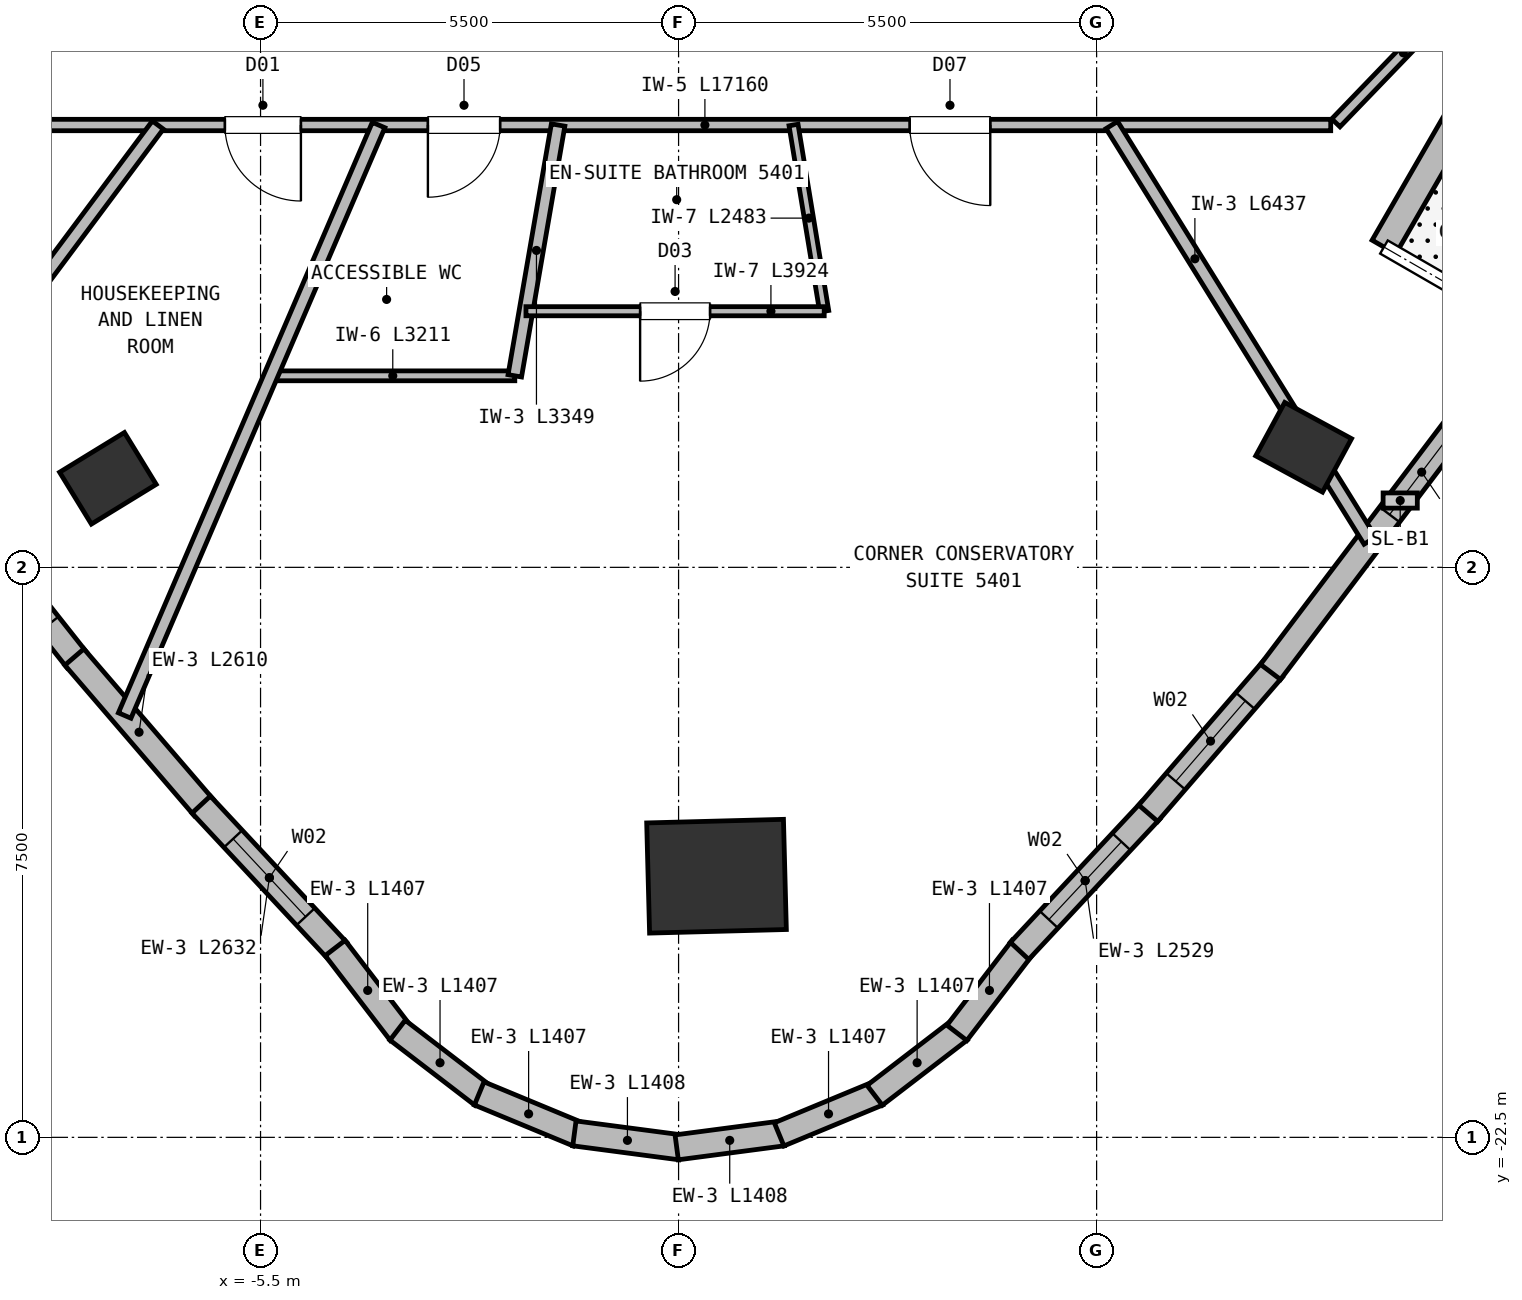
"""IFC4 building model, lengths in metres.
Left out: names, types, materials, properties, quantities, classifications, styles, units other than length and angle.
Written with IfcOpenShell. Run it as: python <this file> out.ifc"""

import sys

from ifc_helpers import new_model, si_unit, direction, frame, frame_2d, origin, origin_2d, place, context, subcontext, project, spatial, rectangle, extrude, element, fill, save


model = new_model("IFC4")
c1 = context("Model", 3, precision=1e-05, world=origin(), true_north=direction((0.0, 1.0)))
c2 = subcontext(c1, "Body", "Model", "MODEL_VIEW")
j1 = project(units=[si_unit("LENGTHUNIT", "METRE"), si_unit("PLANEANGLEUNIT", "RADIAN")], contexts=[c1])
p1 = place(None, origin())
s1 = spatial("IfcSite", under=j1, at=p1, CompositionType="ELEMENT")
p2 = place(p1, origin())
s2 = spatial("IfcBuilding", under=s1, at=p2, CompositionType="ELEMENT")
p3 = place(p2, frame((0.0, 0.0, 205.55)))
s3 = spatial("IfcBuildingStorey", under=s2, at=p3, CompositionType="ELEMENT", Elevation=205.55)
p4 = place(p3, frame((-7.508, -13.828, 0.0), z_axis=(0.0, 0.0, 1.0), x_axis=(-0.522498564716, 0.852640164354, 0.0)))
e1 = element("IfcColumn", 1, at=p4, inside=s3, PredefinedType="COLUMN", context=c2, shape_type="SweptSolid", body=[
    extrude(rectangle(XDim=0.8, YDim=1.0, at=origin_2d()), origin(), (0.0, 0.0, 1.0), 3.8),
])
p5 = place(p3, frame((0.499, -19.064, 0.0), z_axis=(0.0, 0.0, 1.0), x_axis=(-0.026176948308, 0.999657324976, 0.0)))
e2 = element("IfcColumn", 2, at=p5, inside=s3, PredefinedType="COLUMN", context=c2, shape_type="SweptSolid", body=[
    extrude(rectangle(XDim=1.45, YDim=1.8, at=origin_2d()), origin(), (0.0, 0.0, 1.0), 3.8),
])
p6 = place(p3, frame((8.224, -13.42, 0.0), z_axis=(0.0, 0.0, 1.0), x_axis=(0.47715876026, 0.878817112662, 0.0)))
e3 = element("IfcColumn", 3, at=p6, inside=s3, PredefinedType="COLUMN", context=c2, shape_type="SweptSolid", body=[
    extrude(rectangle(XDim=0.8, YDim=1.0, at=origin_2d()), origin(), (0.0, 0.0, 1.0), 3.8),
])
p7 = place(p3, frame((13.981, -2.645, 0.0), z_axis=(0.0, 0.0, 1.0), x_axis=(-0.500004972392, -0.866022532953, 0.0)))
e4 = element("IfcWall", 4, at=p7, inside=s3, PredefinedType="SOLIDWALL", context=c2, shape_type="SweptSolid", body=[
    extrude(rectangle(XDim=9.4, YDim=0.36, at=frame_2d((4.7, 0.0))), origin(), (0.0, 0.0, 1.0), 3.23),
])
p8 = place(p7, frame((5.6, 0.0, 0.0)))
e5 = element("IfcOpeningElement", 5, at=p8, cuts=e4, PredefinedType="OPENING", context=c2, shape_type="SweptSolid", body=[
    extrude(rectangle(XDim=1.65, YDim=2.25, at=frame_2d((0.825, 1.125))), frame((0.0, 0.19, 0.0), z_axis=(0.0, -1.0, 0.0), x_axis=(1.0, 0.0, 0.0)), (0.0, 0.0, 1.0), 0.38),
])
p9 = place(p3, frame((-7.917, -16.219, 0.0), z_axis=(0.0, 0.0, 1.0), x_axis=(-0.62057509915, 0.784147018304, 0.0)))
e6 = element("IfcWall", 6, at=p9, inside=s3, PredefinedType="SOLIDWALL", context=c2, shape_type="SweptSolid", body=[
    extrude(rectangle(XDim=2.593, YDim=0.33, at=frame_2d((1.296, 0.0))), origin(), (0.0, 0.0, 1.0), 3.55),
])
p10 = place(p9, frame((0.596, 0.0, 0.72)))
e7 = element("IfcOpeningElement", 7, at=p10, cuts=e6, PredefinedType="OPENING", context=c2, shape_type="SweptSolid", body=[
    extrude(rectangle(XDim=1.4, YDim=1.84, at=frame_2d((0.7, 0.92))), frame((0.0, 0.175, 0.0), z_axis=(0.0, -1.0, 0.0), x_axis=(1.0, 0.0, 0.0)), (0.0, 0.0, 1.0), 0.35),
])
p11 = place(p3, frame((-6.248, -18.159, 0.0), z_axis=(0.0, 0.0, 1.0), x_axis=(-0.651976891987, 0.758238835932, 0.0)))
e8 = element("IfcWall", 8, at=p11, inside=s3, PredefinedType="SOLIDWALL", context=c2, shape_type="SweptSolid", body=[
    extrude(rectangle(XDim=2.61, YDim=0.33, at=frame_2d((1.305, 0.0))), origin(), (0.0, 0.0, 1.0), 3.55),
])
p12 = place(p3, frame((-4.486, -20.047, 0.0), z_axis=(0.0, 0.0, 1.0), x_axis=(-0.68190500199, 0.731440748291, 0.0)))
e9 = element("IfcWall", 9, at=p12, inside=s3, PredefinedType="SOLIDWALL", context=c2, shape_type="SweptSolid", body=[
    extrude(rectangle(XDim=2.632, YDim=0.33, at=frame_2d((1.316, 0.0))), origin(), (0.0, 0.0, 1.0), 3.55),
])
p13 = place(p12, frame((0.616, 0.0, 0.72)))
e10 = element("IfcOpeningElement", 10, at=p13, cuts=e9, PredefinedType="OPENING", context=c2, shape_type="SweptSolid", body=[
    extrude(rectangle(XDim=1.4, YDim=1.84, at=frame_2d((0.7, 0.92))), frame((0.0, 0.175, 0.0), z_axis=(0.0, -1.0, 0.0), x_axis=(1.0, 0.0, 0.0)), (0.0, 0.0, 1.0), 0.35),
])
p14 = place(p3, frame((-3.662, -21.125, 0.0), z_axis=(0.0, 0.0, 1.0), x_axis=(-0.608762923213, 0.793352193746, 0.0)))
e11 = element("IfcWall", 11, at=p14, inside=s3, PredefinedType="SOLIDWALL", context=c2, shape_type="SweptSolid", body=[
    extrude(rectangle(XDim=1.407, YDim=0.33, at=frame_2d((0.704, 0.0))), origin(), (0.0, 0.0, 1.0), 3.55),
])
for number, where, z_axis, x_axis in (
    (12, (-2.58, -21.947, 0.0), (0.0, 0.0, 1.0), (-0.793, 0.609, 0.0)),
    (13, (-1.323, -22.461, 0.0), (0.0, 0.0, 1.0), (-0.924, 0.383, 0.0)),
    (14, (0.025, -22.632, 0.0), (0.0, 0.0, 1.0), (-0.991, 0.131, 0.0)),
    (15, (1.371, -22.448, 0.0), (0.0, 0.0, 1.0), (-0.991, -0.131, 0.0)),
    (16, (2.623, -21.922, 0.0), (0.0, 0.0, 1.0), (-0.924, -0.383, 0.0)),
    (17, (3.697, -21.09, 0.0), (0.0, 0.0, 1.0), (-0.793, -0.609, 0.0)),
):
    element("IfcWall", number, at=place(p3, frame(where, z_axis=z_axis, x_axis=x_axis)), inside=s3, PredefinedType="SOLIDWALL", context=c2, shape_type="SweptSolid", body=[
        extrude(rectangle(XDim=1.407, YDim=0.33, at=frame_2d((0.704, 0.0))), origin(), (0.0, 0.0, 1.0), 3.55),
    ])
p15 = place(p3, frame((4.519, -20.009, 0.0), z_axis=(0.0, 0.0, 1.0), x_axis=(-0.608762923213, -0.793352193746, 0.0)))
e18 = element("IfcWall", 18, at=p15, inside=s3, PredefinedType="SOLIDWALL", context=c2, shape_type="SweptSolid", body=[
    extrude(rectangle(XDim=1.407, YDim=0.33, at=frame_2d((0.704, 0.0))), origin(), (0.0, 0.0, 1.0), 3.55),
])
p16 = place(p3, frame((6.212, -18.198, 0.0), z_axis=(0.0, 0.0, 1.0), x_axis=(-0.68256240295, -0.730827316183, 0.0)))
e19 = element("IfcWall", 19, at=p16, inside=s3, PredefinedType="SOLIDWALL", context=c2, shape_type="SweptSolid", body=[
    extrude(rectangle(XDim=2.529, YDim=0.33, at=frame_2d((1.265, 0.0))), origin(), (0.0, 0.0, 1.0), 3.55),
])
p17 = place(p16, frame((0.564, 0.0, 0.72)))
e20 = element("IfcOpeningElement", 20, at=p17, cuts=e19, PredefinedType="OPENING", context=c2, shape_type="SweptSolid", body=[
    extrude(rectangle(XDim=1.4, YDim=1.84, at=frame_2d((0.7, 0.92))), frame((0.0, 0.175, 0.0), z_axis=(0.0, -1.0, 0.0), x_axis=(1.0, 0.0, 0.0)), (0.0, 0.0, 1.0), 0.35),
])
p18 = place(p3, frame((7.819, -16.337, 0.0), z_axis=(0.0, 0.0, 1.0), x_axis=(-0.653799751014, -0.756667618954, 0.0)))
e21 = element("IfcWall", 21, at=p18, inside=s3, PredefinedType="SOLIDWALL", context=c2, shape_type="SweptSolid", body=[
    extrude(rectangle(XDim=2.509, YDim=0.33, at=frame_2d((1.254, 0.0))), origin(), (0.0, 0.0, 1.0), 3.55),
])
p19 = place(p18, frame((0.554, 0.0, 0.72)))
e22 = element("IfcOpeningElement", 22, at=p19, cuts=e21, PredefinedType="OPENING", context=c2, shape_type="SweptSolid", body=[
    extrude(rectangle(XDim=1.4, YDim=1.84, at=frame_2d((0.7, 0.92))), frame((0.0, 0.175, 0.0), z_axis=(0.0, -1.0, 0.0), x_axis=(1.0, 0.0, 0.0)), (0.0, 0.0, 1.0), 0.35),
])
p20 = place(p3, frame((11.201, -11.865, 0.0), z_axis=(0.0, 0.0, 1.0), x_axis=(-0.603392230828, -0.797444553418, 0.0)))
e23 = element("IfcWall", 23, at=p20, inside=s3, PredefinedType="SOLIDWALL", context=c2, shape_type="SweptSolid", body=[
    extrude(rectangle(XDim=5.656, YDim=0.33, at=frame_2d((2.828, 0.0))), origin(), (0.0, 0.0, 1.0), 3.55),
])
p21 = place(p20, frame((1.66, 0.0, 0.72)))
e24 = element("IfcOpeningElement", 24, at=p21, cuts=e23, PredefinedType="OPENING", context=c2, shape_type="SweptSolid", body=[
    extrude(rectangle(XDim=1.4, YDim=1.88, at=frame_2d((0.7, 0.94))), frame((0.0, 0.175, 0.0), z_axis=(0.0, -1.0, 0.0), x_axis=(1.0, 0.0, 0.0)), (0.0, 0.0, 1.0), 0.35),
])
p22 = place(p3, frame((8.58, -9.18, 0.0), z_axis=(0.0, 0.0, 1.0), x_axis=(-1.0, 0.0, 0.0)))
e25 = element("IfcWall", 25, at=p22, inside=s3, PredefinedType="PARTITIONING", context=c2, shape_type="SweptSolid", body=[
    extrude(rectangle(XDim=17.16, YDim=0.15, at=frame_2d((8.58, 0.0))), origin(), (0.0, 0.0, 1.0), 3.23),
])
p23 = place(p22, frame((10.928, 0.0, 0.0)))
e26 = element("IfcOpeningElement", 26, at=p23, cuts=e25, PredefinedType="OPENING", context=c2, shape_type="SweptSolid", body=[
    extrude(rectangle(XDim=0.95, YDim=2.1, at=frame_2d((0.475, 1.05))), frame((0.0, 0.085, 0.0), z_axis=(0.0, -1.0, 0.0), x_axis=(1.0, 0.0, 0.0)), (0.0, 0.0, 1.0), 0.17),
])
p24 = place(p22, frame((13.549, 0.0, 0.0)))
e27 = element("IfcOpeningElement", 27, at=p24, cuts=e25, PredefinedType="OPENING", context=c2, shape_type="SweptSolid", body=[
    extrude(rectangle(XDim=1.0, YDim=2.15, at=frame_2d((0.5, 1.075))), frame((0.0, 0.085, 0.0), z_axis=(0.0, -1.0, 0.0), x_axis=(1.0, 0.0, 0.0)), (0.0, 0.0, 1.0), 0.17),
])
p25 = place(p22, frame((4.479, 0.0, 0.0)))
e28 = element("IfcOpeningElement", 28, at=p25, cuts=e25, PredefinedType="OPENING", context=c2, shape_type="SweptSolid", body=[
    extrude(rectangle(XDim=1.06, YDim=2.15, at=frame_2d((0.53, 1.075))), frame((0.0, 0.085, 0.0), z_axis=(0.0, -1.0, 0.0), x_axis=(1.0, 0.0, 0.0)), (0.0, 0.0, 1.0), 0.17),
])
p26 = place(p3, frame((10.422, -7.309, 0.0), z_axis=(0.0, 0.0, 1.0), x_axis=(-0.693764562202, -0.720201869085, 0.0)))
e29 = element("IfcWall", 29, at=p26, inside=s3, PredefinedType="PARTITIONING", context=c2, shape_type="SweptSolid", body=[
    extrude(rectangle(XDim=2.558, YDim=0.15, at=frame_2d((1.279, 0.0))), origin(), (0.0, 0.0, 1.0), 3.23),
])
p27 = place(p3, frame((-2.155, -12.48, 0.0), z_axis=(0.0, 0.0, 1.0), x_axis=(-1.0, 0.0, 0.0)))
e30 = element("IfcWall", 30, at=p27, inside=s3, PredefinedType="PARTITIONING", context=c2, shape_type="SweptSolid", body=[
    extrude(rectangle(XDim=3.211, YDim=0.13, at=frame_2d((1.605, 0.0))), origin(), (0.0, 0.0, 1.0), 3.55),
])
p28 = place(p3, frame((-1.585, -9.18, 0.0), z_axis=(0.0, 0.0, 1.0), x_axis=(-0.170153481889, -0.985417572708, 0.0)))
e31 = element("IfcWall", 31, at=p28, inside=s3, PredefinedType="PARTITIONING", context=c2, shape_type="SweptSolid", body=[
    extrude(rectangle(XDim=3.349, YDim=0.18, at=frame_2d((1.674, 0.0))), origin(), (0.0, 0.0, 1.0), 3.55),
])
p29 = place(p3, frame((1.916, -11.63, 0.0), z_axis=(0.0, 0.0, 1.0), x_axis=(-0.162628879968, 0.986687309841, 0.0)))
e32 = element("IfcWall", 32, at=p29, inside=s3, PredefinedType="PARTITIONING", context=c2, shape_type="SweptSolid", body=[
    extrude(rectangle(XDim=2.483, YDim=0.12, at=frame_2d((1.241, 0.0))), origin(), (0.0, 0.0, 1.0), 3.55),
])
p30 = place(p3, frame((1.916, -11.63, 0.0), z_axis=(0.0, 0.0, 1.0), x_axis=(-1.0, 0.0, 0.0)))
e33 = element("IfcWall", 33, at=p30, inside=s3, PredefinedType="PARTITIONING", context=c2, shape_type="SweptSolid", body=[
    extrude(rectangle(XDim=3.924, YDim=0.12, at=frame_2d((1.962, 0.0))), origin(), (0.0, 0.0, 1.0), 3.23),
])
p31 = place(p30, frame((1.502, 0.0, 0.0)))
e34 = element("IfcOpeningElement", 34, at=p31, cuts=e33, PredefinedType="OPENING", context=c2, shape_type="SweptSolid", body=[
    extrude(rectangle(XDim=0.92, YDim=2.1, at=frame_2d((0.46, 1.05))), frame((0.0, 0.07, 0.0), z_axis=(0.0, -1.0, 0.0), x_axis=(1.0, 0.0, 0.0)), (0.0, 0.0, 1.0), 0.14),
])
p32 = place(p3, frame((5.7, -9.18, 0.0), z_axis=(0.0, 0.0, 1.0), x_axis=(0.527494096937, -0.849558695851, 0.0)))
e35 = element("IfcWall", 35, at=p32, inside=s3, PredefinedType="PARTITIONING", context=c2, shape_type="SweptSolid", body=[
    extrude(rectangle(XDim=6.437, YDim=0.18, at=frame_2d((3.218, 0.0))), origin(), (0.0, 0.0, 1.0), 3.55),
])
p33 = place(p3, frame((-6.851, -9.18, 0.0), z_axis=(0.0, 0.0, 1.0), x_axis=(-0.598105864396, -0.801417104244, 0.0)))
e36 = element("IfcWall", 36, at=p33, inside=s3, PredefinedType="PARTITIONING", context=c2, shape_type="SweptSolid", body=[
    extrude(rectangle(XDim=5.346, YDim=0.18, at=frame_2d((2.673, 0.0))), origin(), (0.0, 0.0, 1.0), 3.55),
])
p34 = place(p3, frame((-3.947, -9.18, 0.0), z_axis=(0.0, 0.0, 1.0), x_axis=(-0.394985116266, -0.918687519197, 0.0)))
e37 = element("IfcWall", 37, at=p34, inside=s3, PredefinedType="PARTITIONING", context=c2, shape_type="SweptSolid", body=[
    extrude(rectangle(XDim=8.458, YDim=0.18, at=frame_2d((4.229, 0.0))), origin(), (0.0, 0.0, 1.0), 3.55),
])
p35 = place(p13, origin())
e38 = element("IfcWindow", 38, at=p35, inside=s3, PartitioningType="SINGLE_PANEL", PredefinedType="WINDOW", context=c2, shape_type="SweptSolid", body=[
    extrude(rectangle(XDim=1.4, YDim=1.84, at=frame_2d((0.7, 0.92))), frame((0.0, 0.03, 0.0), z_axis=(0.0, -1.0, 0.0), x_axis=(1.0, 0.0, 0.0)), (0.0, 0.0, 1.0), 0.06),
])
fill(e10, e38)
p36 = place(p17, origin())
e39 = element("IfcWindow", 39, at=p36, inside=s3, PartitioningType="SINGLE_PANEL", PredefinedType="WINDOW", context=c2, shape_type="SweptSolid", body=[
    extrude(rectangle(XDim=1.4, YDim=1.84, at=frame_2d((0.7, 0.92))), frame((0.0, 0.03, 0.0), z_axis=(0.0, -1.0, 0.0), x_axis=(1.0, 0.0, 0.0)), (0.0, 0.0, 1.0), 0.06),
])
fill(e20, e39)
p37 = place(p19, origin())
e40 = element("IfcWindow", 40, at=p37, inside=s3, PartitioningType="SINGLE_PANEL", PredefinedType="WINDOW", context=c2, shape_type="SweptSolid", body=[
    extrude(rectangle(XDim=1.4, YDim=1.84, at=frame_2d((0.7, 0.92))), frame((0.0, 0.03, 0.0), z_axis=(0.0, -1.0, 0.0), x_axis=(1.0, 0.0, 0.0)), (0.0, 0.0, 1.0), 0.06),
])
fill(e22, e40)
p38 = place(p21, origin())
e41 = element("IfcWindow", 41, at=p38, inside=s3, PartitioningType="SINGLE_PANEL", PredefinedType="WINDOW", context=c2, shape_type="SweptSolid", body=[
    extrude(rectangle(XDim=1.4, YDim=1.88, at=frame_2d((0.7, 0.94))), frame((0.0, 0.03, 0.0), z_axis=(0.0, -1.0, 0.0), x_axis=(1.0, 0.0, 0.0)), (0.0, 0.0, 1.0), 0.06),
])
fill(e24, e41)
p39 = place(p31, origin())
e42 = element("IfcDoor", 42, at=p39, inside=s3, OperationType="SINGLE_SWING_RIGHT", PredefinedType="DOOR", context=c2, shape_type="SweptSolid", body=[
    extrude(rectangle(XDim=0.92, YDim=2.1, at=frame_2d((0.46, 1.05))), frame((0.0, 0.025, 0.0), z_axis=(0.0, -1.0, 0.0), x_axis=(1.0, 0.0, 0.0)), (0.0, 0.0, 1.0), 0.05),
])
fill(e34, e42)
p40 = place(p23, origin())
e43 = element("IfcDoor", 43, at=p40, inside=s3, OperationType="SINGLE_SWING_RIGHT", PredefinedType="DOOR", context=c2, shape_type="SweptSolid", body=[
    extrude(rectangle(XDim=0.95, YDim=2.1, at=frame_2d((0.475, 1.05))), frame((0.0, 0.025, 0.0), z_axis=(0.0, -1.0, 0.0), x_axis=(1.0, 0.0, 0.0)), (0.0, 0.0, 1.0), 0.05),
])
fill(e26, e43)
p41 = place(p24, origin())
e44 = element("IfcDoor", 44, at=p41, inside=s3, OperationType="SINGLE_SWING_LEFT", PredefinedType="DOOR", context=c2, shape_type="SweptSolid", body=[
    extrude(rectangle(XDim=1.0, YDim=2.15, at=frame_2d((0.5, 1.075))), frame((0.0, 0.025, 0.0), z_axis=(0.0, -1.0, 0.0), x_axis=(1.0, 0.0, 0.0)), (0.0, 0.0, 1.0), 0.05),
])
fill(e27, e44)
p42 = place(p25, origin())
e45 = element("IfcDoor", 45, at=p42, inside=s3, OperationType="SINGLE_SWING_LEFT", PredefinedType="DOOR", context=c2, shape_type="SweptSolid", body=[
    extrude(rectangle(XDim=1.06, YDim=2.15, at=frame_2d((0.53, 1.075))), frame((0.0, 0.025, 0.0), z_axis=(0.0, -1.0, 0.0), x_axis=(1.0, 0.0, 0.0)), (0.0, 0.0, 1.0), 0.05),
])
fill(e28, e45)
save(model, sys.argv[1])
